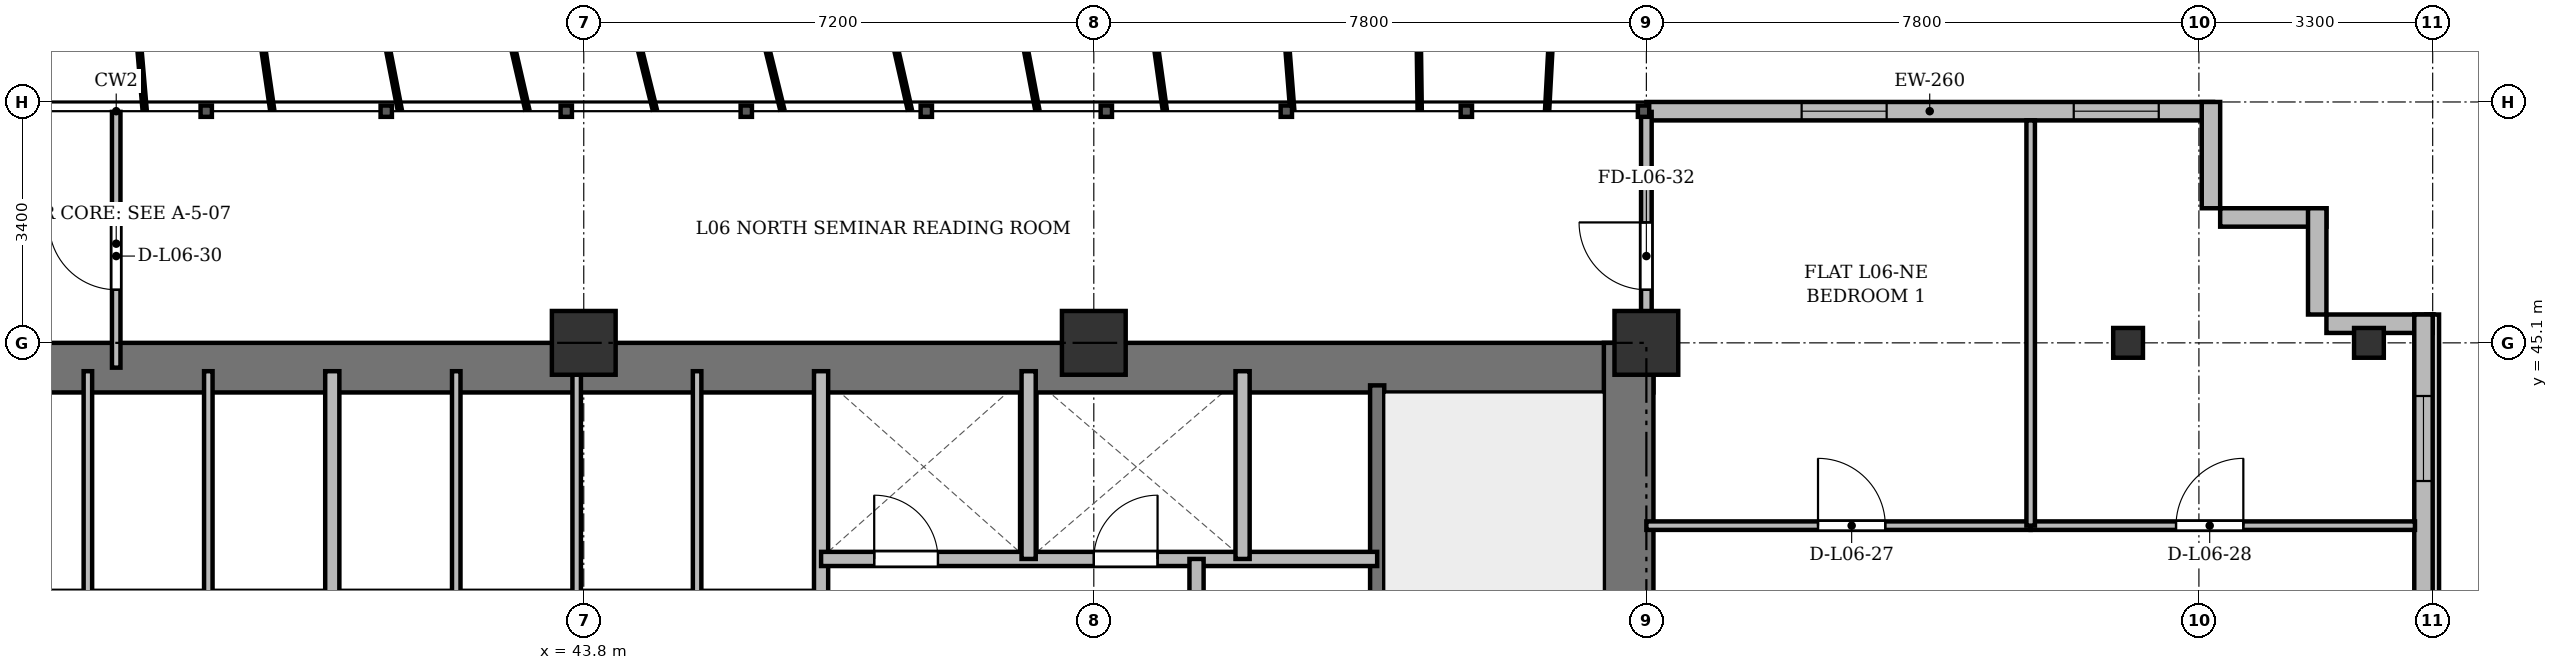
"""IFC4 building model, lengths in metres.
Left out: names, types, materials, properties, quantities, classifications, styles, units other than length and angle.
Written with IfcOpenShell. Run it as: python <this file> out.ifc"""

import sys

from ifc_helpers import new_model, si_unit, direction, frame, frame_2d, origin, origin_2d, place, context, subcontext, project, spatial, rectangle, i_section, extrude, source, transform, mapped, element, fill, save


model = new_model("IFC4")
c1 = context("Model", 3, precision=1e-05, world=origin(), true_north=direction((0.0, 1.0)))
c2 = subcontext(c1, "Body", "Model", "MODEL_VIEW")
j1 = project(units=[si_unit("LENGTHUNIT", "METRE"), si_unit("PLANEANGLEUNIT", "RADIAN")], contexts=[c1])
p1 = place(None, origin())
s1 = spatial("IfcSite", under=j1, at=p1, CompositionType="ELEMENT")
p2 = place(p1, origin())
s2 = spatial("IfcBuilding", under=s1, at=p2, CompositionType="ELEMENT")
p3 = place(p2, frame((0.0, 0.0, 27.1)))
s3 = spatial("IfcBuildingStorey", under=s2, at=p3, CompositionType="ELEMENT", Elevation=27.1)
m1 = source(origin(), c2, "Body", "SweptSolid", [
    extrude(rectangle(XDim=0.9, YDim=0.9, at=origin_2d()), origin(), (0.0, 0.0, 1.0), 3.6),
])
for number, where, z_axis, x_axis in (
    (1, (43.8, 45.1, 0.0), (0.0, 0.0, 1.0), (1.0, 0.0, 0.0)),
    (2, (51.0, 45.1, 0.0), (0.0, 0.0, 1.0), (1.0, 0.0, 0.0)),
    (3, (58.8, 45.1, 0.0), (0.0, 0.0, 1.0), (1.0, 0.0, 0.0)),
):
    element("IfcColumn", number, at=place(p3, frame(where, z_axis=z_axis, x_axis=x_axis)), inside=s3, PredefinedType="COLUMN", context=c2, shape_type="MappedRepresentation", body=[
        mapped(m1, transform((0.0, 0.0, 0.0), x_axis=(1.0, 0.0, 0.0), y_axis=(0.0, 1.0, 0.0), z_axis=(0.0, 0.0, 1.0), scale=1.0)),
    ])
m2 = source(origin(), c2, "Body", "SweptSolid", [
    extrude(i_section(OverallWidth=0.42, OverallDepth=0.42, WebThickness=0.026, FlangeThickness=0.04, at=origin_2d()), origin(), (0.0, 0.0, 1.0), 3.6),
])
for number, where, z_axis, x_axis in (
    (4, (65.6, 45.1, 0.0), (0.0, 0.0, 1.0), (1.0, 0.0, 0.0)),
    (5, (69.0, 45.1, 0.0), (0.0, 0.0, 1.0), (1.0, 0.0, 0.0)),
):
    element("IfcColumn", number, at=place(p3, frame(where, z_axis=z_axis, x_axis=x_axis)), inside=s3, PredefinedType="COLUMN", context=c2, shape_type="MappedRepresentation", body=[
        mapped(m2, transform((0.0, 0.0, 0.0), x_axis=(1.0, 0.0, 0.0), y_axis=(0.0, 1.0, 0.0), z_axis=(0.0, 0.0, 1.0), scale=1.0)),
    ])
p4 = place(p3, frame((58.8, 48.37, 0.0), z_axis=(0.0, 0.0, 1.0), x_axis=(1.0, 0.0, 0.0)))
e6 = element("IfcWall", 6, at=p4, inside=s3, PredefinedType="SOLIDWALL", context=c2, shape_type="SweptSolid", body=[
    extrude(rectangle(XDim=8.0, YDim=0.26, at=frame_2d((4.0, 0.0))), origin(), (0.0, 0.0, 1.0), 3.34),
])
p5 = place(p4, frame((2.192, 0.0, 0.9)))
e7 = element("IfcOpeningElement", 7, at=p5, cuts=e6, PredefinedType="OPENING", context=c2, shape_type="SweptSolid", body=[
    extrude(rectangle(XDim=1.2, YDim=1.65, at=frame_2d((0.6, 0.825))), frame((0.0, 0.14, 0.0), z_axis=(0.0, -1.0, 0.0), x_axis=(1.0, 0.0, 0.0)), (0.0, 0.0, 1.0), 0.28),
])
p6 = place(p4, frame((6.033, 0.0, 0.9)))
e8 = element("IfcOpeningElement", 8, at=p6, cuts=e6, PredefinedType="OPENING", context=c2, shape_type="SweptSolid", body=[
    extrude(rectangle(XDim=1.2, YDim=1.65, at=frame_2d((0.6, 0.825))), frame((0.0, 0.14, 0.0), z_axis=(0.0, -1.0, 0.0), x_axis=(1.0, 0.0, 0.0)), (0.0, 0.0, 1.0), 0.28),
])
for number, where, z_axis, x_axis in (
    (9, (66.77, 48.5, 0.0), (0.0, 0.0, 1.0), (0.0, -1.0, 0.0)),
    (10, (66.9, 46.87, 0.0), (0.0, 0.0, 1.0), (1.0, 0.0, 0.0)),
    (11, (68.27, 47.0, 0.0), (0.0, 0.0, 1.0), (0.0, -1.0, 0.0)),
):
    element("IfcWall", number, at=place(p3, frame(where, z_axis=z_axis, x_axis=x_axis)), inside=s3, PredefinedType="SOLIDWALL", context=c2, shape_type="SweptSolid", body=[
        extrude(rectangle(XDim=1.5, YDim=0.26, at=frame_2d((0.75, 0.0))), origin(), (0.0, 0.0, 1.0), 3.34),
    ])
p7 = place(p3, frame((68.4, 45.37, 0.0), z_axis=(0.0, 0.0, 1.0), x_axis=(1.0, 0.0, 0.0)))
e12 = element("IfcWall", 12, at=p7, inside=s3, PredefinedType="SOLIDWALL", context=c2, shape_type="SweptSolid", body=[
    extrude(rectangle(XDim=1.5, YDim=0.26, at=frame_2d((0.75, 0.0))), origin(), (0.0, 0.0, 1.0), 2.69),
])
p8 = place(p3, frame((69.77, 45.5, 0.0), z_axis=(0.0, 0.0, 1.0), x_axis=(0.0, -1.0, 0.0)))
e13 = element("IfcWall", 13, at=p8, inside=s3, PredefinedType="SOLIDWALL", context=c2, shape_type="SweptSolid", body=[
    extrude(rectangle(XDim=39.6, YDim=0.26, at=frame_2d((19.8, 0.0))), origin(), (0.0, 0.0, 1.0), 3.34),
])
p9 = place(p8, frame((36.95, 0.0, 0.92)))
e14 = element("IfcOpeningElement", 14, at=p9, cuts=e13, PredefinedType="OPENING", context=c2, shape_type="SweptSolid", body=[
    extrude(rectangle(XDim=1.2, YDim=1.65, at=frame_2d((0.6, 0.825))), frame((0.0, 0.14, 0.0), z_axis=(0.0, -1.0, 0.0), x_axis=(1.0, 0.0, 0.0)), (0.0, 0.0, 1.0), 0.28),
])
p10 = place(p8, frame((32.8, 0.0, 0.92)))
e15 = element("IfcOpeningElement", 15, at=p10, cuts=e13, PredefinedType="OPENING", context=c2, shape_type="SweptSolid", body=[
    extrude(rectangle(XDim=2.6, YDim=1.9, at=frame_2d((1.3, 0.95))), frame((0.0, 0.14, 0.0), z_axis=(0.0, -1.0, 0.0), x_axis=(1.0, 0.0, 0.0)), (0.0, 0.0, 1.0), 0.28),
])
p11 = place(p8, frame((28.6, 0.0, 0.92)))
e16 = element("IfcOpeningElement", 16, at=p11, cuts=e13, PredefinedType="OPENING", context=c2, shape_type="SweptSolid", body=[
    extrude(rectangle(XDim=2.6, YDim=1.9, at=frame_2d((1.3, 0.95))), frame((0.0, 0.14, 0.0), z_axis=(0.0, -1.0, 0.0), x_axis=(1.0, 0.0, 0.0)), (0.0, 0.0, 1.0), 0.28),
])
p12 = place(p8, frame((7.4, 0.0, 0.92)))
e17 = element("IfcOpeningElement", 17, at=p12, cuts=e13, PredefinedType="OPENING", context=c2, shape_type="SweptSolid", body=[
    extrude(rectangle(XDim=2.6, YDim=1.9, at=frame_2d((1.3, 0.95))), frame((0.0, 0.14, 0.0), z_axis=(0.0, -1.0, 0.0), x_axis=(1.0, 0.0, 0.0)), (0.0, 0.0, 1.0), 0.28),
])
p13 = place(p8, frame((4.5, 0.0, 0.92)))
e18 = element("IfcOpeningElement", 18, at=p13, cuts=e13, PredefinedType="OPENING", context=c2, shape_type="SweptSolid", body=[
    extrude(rectangle(XDim=1.2, YDim=1.65, at=frame_2d((0.6, 0.825))), frame((0.0, 0.14, 0.0), z_axis=(0.0, -1.0, 0.0), x_axis=(1.0, 0.0, 0.0)), (0.0, 0.0, 1.0), 0.28),
])
p14 = place(p8, frame((1.15, 0.0, 0.92)))
e19 = element("IfcOpeningElement", 19, at=p14, cuts=e13, PredefinedType="OPENING", context=c2, shape_type="SweptSolid", body=[
    extrude(rectangle(XDim=1.2, YDim=1.65, at=frame_2d((0.6, 0.825))), frame((0.0, 0.14, 0.0), z_axis=(0.0, -1.0, 0.0), x_axis=(1.0, 0.0, 0.0)), (0.0, 0.0, 1.0), 0.28),
])
p15 = place(p3, frame((15.5, 44.75, 0.0), z_axis=(0.0, 0.0, 1.0), x_axis=(1.0, 0.0, 0.0)))
e20 = element("IfcWall", 20, at=p15, inside=s3, PredefinedType="SHEAR", context=c2, shape_type="SweptSolid", body=[
    extrude(rectangle(XDim=43.4, YDim=0.7, at=frame_2d((21.7, 0.0))), origin(), (0.0, 0.0, 1.0), 3.34),
])
p16 = place(p3, frame((58.55, 33.4, 0.0), z_axis=(0.0, 0.0, 1.0), x_axis=(0.0, 1.0, 0.0)))
e21 = element("IfcWall", 21, at=p16, inside=s3, PredefinedType="SHEAR", context=c2, shape_type="SweptSolid", body=[
    extrude(rectangle(XDim=11.7, YDim=0.7, at=frame_2d((5.85, 0.0))), origin(), (0.0, 0.0, 1.0), 3.34),
])
p17 = place(p3, frame((55.0, 33.4, 0.0), z_axis=(0.0, 0.0, 1.0), x_axis=(0.0, 1.0, 0.0)))
e22 = element("IfcWall", 22, at=p17, inside=s3, PredefinedType="SHEAR", context=c2, shape_type="SweptSolid", body=[
    extrude(rectangle(XDim=11.1, YDim=0.2, at=frame_2d((5.55, 0.0))), origin(), (0.0, 0.0, 1.0), 3.34),
])
p18 = place(p17, frame((0.85, 0.0, 0.0)))
e23 = element("IfcOpeningElement", 23, at=p18, cuts=e22, PredefinedType="OPENING", context=c2, shape_type="SweptSolid", body=[
    extrude(rectangle(XDim=1.1, YDim=2.15, at=frame_2d((0.55, 1.075))), frame((0.0, 0.11, 0.0), z_axis=(0.0, -1.0, 0.0), x_axis=(1.0, 0.0, 0.0)), (0.0, 0.0, 1.0), 0.22),
])
for number, where, z_axis, x_axis in (
    (24, (36.8, 41.5, 0.0), (0.0, 0.0, 1.0), (0.0, 1.0, 0.0)),
    (25, (38.5, 41.5, 0.0), (0.0, 0.0, 1.0), (0.0, 1.0, 0.0)),
):
    element("IfcWall", number, at=place(p3, frame(where, z_axis=z_axis, x_axis=x_axis)), inside=s3, PredefinedType="PARTITIONING", context=c2, shape_type="SweptSolid", body=[
        extrude(rectangle(XDim=3.2, YDim=0.12, at=frame_2d((1.6, 0.0))), origin(), (0.0, 0.0, 1.0), 3.34),
    ])
p19 = place(p3, frame((40.25, 41.5, 0.0), z_axis=(0.0, 0.0, 1.0), x_axis=(0.0, 1.0, 0.0)))
e26 = element("IfcWall", 26, at=p19, inside=s3, PredefinedType="SOLIDWALL", context=c2, shape_type="SweptSolid", body=[
    extrude(rectangle(XDim=3.2, YDim=0.2, at=frame_2d((1.6, 0.0))), origin(), (0.0, 0.0, 1.0), 3.34),
])
p20 = place(p3, frame((42.0, 41.5, 0.0), z_axis=(0.0, 0.0, 1.0), x_axis=(0.0, 1.0, 0.0)))
e27 = element("IfcWall", 27, at=p20, inside=s3, PredefinedType="PARTITIONING", context=c2, shape_type="SweptSolid", body=[
    extrude(rectangle(XDim=3.2, YDim=0.12, at=frame_2d((1.6, 0.0))), origin(), (0.0, 0.0, 1.0), 3.34),
])
p21 = place(p3, frame((43.7, 41.5, 0.0), z_axis=(0.0, 0.0, 1.0), x_axis=(0.0, 1.0, 0.0)))
e28 = element("IfcWall", 28, at=p21, inside=s3, PredefinedType="PARTITIONING", context=c2, shape_type="SweptSolid", body=[
    extrude(rectangle(XDim=3.2, YDim=0.12, at=frame_2d((1.6, 0.0))), origin(), (0.0, 0.0, 1.0), 2.752),
])
p22 = place(p3, frame((45.4, 41.5, 0.0), z_axis=(0.0, 0.0, 1.0), x_axis=(0.0, 1.0, 0.0)))
e29 = element("IfcWall", 29, at=p22, inside=s3, PredefinedType="PARTITIONING", context=c2, shape_type="SweptSolid", body=[
    extrude(rectangle(XDim=3.2, YDim=0.12, at=frame_2d((1.6, 0.0))), origin(), (0.0, 0.0, 1.0), 3.34),
])
p23 = place(p3, frame((47.15, 33.4, 0.0), z_axis=(0.0, 0.0, 1.0), x_axis=(0.0, 1.0, 0.0)))
e30 = element("IfcWall", 30, at=p23, inside=s3, PredefinedType="SOLIDWALL", context=c2, shape_type="SweptSolid", body=[
    extrude(rectangle(XDim=11.3, YDim=0.2, at=frame_2d((5.65, 0.0))), origin(), (0.0, 0.0, 1.0), 2.69),
])
p24 = place(p3, frame((47.15, 42.05, 0.0), z_axis=(0.0, 0.0, 1.0), x_axis=(1.0, 0.0, 0.0)))
e31 = element("IfcWall", 31, at=p24, inside=s3, PredefinedType="SOLIDWALL", context=c2, shape_type="SweptSolid", body=[
    extrude(rectangle(XDim=7.85, YDim=0.2, at=frame_2d((3.925, 0.0))), origin(), (0.0, 0.0, 1.0), 2.752),
])
p25 = place(p24, frame((0.75, 0.0, 0.0)))
e32 = element("IfcOpeningElement", 32, at=p25, cuts=e31, PredefinedType="OPENING", context=c2, shape_type="SweptSolid", body=[
    extrude(rectangle(XDim=0.9, YDim=2.1, at=frame_2d((0.45, 1.05))), frame((0.0, 0.11, 0.0), z_axis=(0.0, -1.0, 0.0), x_axis=(1.0, 0.0, 0.0)), (0.0, 0.0, 1.0), 0.22),
])
p26 = place(p24, frame((3.85, 0.0, 0.0)))
e33 = element("IfcOpeningElement", 33, at=p26, cuts=e31, PredefinedType="OPENING", context=c2, shape_type="SweptSolid", body=[
    extrude(rectangle(XDim=0.9, YDim=2.1, at=frame_2d((0.45, 1.05))), frame((0.0, 0.11, 0.0), z_axis=(0.0, -1.0, 0.0), x_axis=(1.0, 0.0, 0.0)), (0.0, 0.0, 1.0), 0.22),
])
for number, where, z_axis, x_axis in (
    (34, (50.08, 42.05, 0.0), (0.0, 0.0, 1.0), (0.0, 1.0, 0.0)),
    (35, (53.1, 42.05, 0.0), (0.0, 0.0, 1.0), (0.0, 1.0, 0.0)),
):
    element("IfcWall", number, at=place(p3, frame(where, z_axis=z_axis, x_axis=x_axis)), inside=s3, PredefinedType="SOLIDWALL", context=c2, shape_type="SweptSolid", body=[
        extrude(rectangle(XDim=2.65, YDim=0.2, at=frame_2d((1.325, 0.0))), origin(), (0.0, 0.0, 1.0), 3.34),
    ])
p27 = place(p3, frame((52.45, 33.4, 0.0), z_axis=(0.0, 0.0, 1.0), x_axis=(0.0, 1.0, 0.0)))
e36 = element("IfcWall", 36, at=p27, inside=s3, PredefinedType="PARTITIONING", context=c2, shape_type="SweptSolid", body=[
    extrude(rectangle(XDim=8.65, YDim=0.2, at=frame_2d((4.325, 0.0))), origin(), (0.0, 0.0, 1.0), 2.69),
])
p28 = place(p27, frame((6.2, 0.0, 0.0)))
e37 = element("IfcOpeningElement", 37, at=p28, cuts=e36, PredefinedType="OPENING", context=c2, shape_type="SweptSolid", body=[
    extrude(rectangle(XDim=0.95, YDim=2.15, at=frame_2d((0.475, 1.075))), frame((0.0, 0.11, 0.0), z_axis=(0.0, -1.0, 0.0), x_axis=(1.0, 0.0, 0.0)), (0.0, 0.0, 1.0), 0.22),
])
p29 = place(p3, frame((58.8, 42.52, 0.0), z_axis=(0.0, 0.0, 1.0), x_axis=(1.0, 0.0, 0.0)))
e38 = element("IfcWall", 38, at=p29, inside=s3, PredefinedType="PARTITIONING", context=c2, shape_type="SweptSolid", body=[
    extrude(rectangle(XDim=5.425, YDim=0.12, at=frame_2d((2.712, 0.0))), origin(), (0.0, 0.0, 1.0), 2.752),
])
p30 = place(p29, frame((2.423, 0.0, 0.0)))
e39 = element("IfcOpeningElement", 39, at=p30, cuts=e38, PredefinedType="OPENING", context=c2, shape_type="SweptSolid", body=[
    extrude(rectangle(XDim=0.95, YDim=2.15, at=frame_2d((0.475, 1.075))), frame((0.0, 0.07, 0.0), z_axis=(0.0, -1.0, 0.0), x_axis=(1.0, 0.0, 0.0)), (0.0, 0.0, 1.0), 0.14),
])
p31 = place(p3, frame((64.225, 42.52, 0.0), z_axis=(0.0, 0.0, 1.0), x_axis=(1.0, 0.0, 0.0)))
e40 = element("IfcWall", 40, at=p31, inside=s3, PredefinedType="PARTITIONING", context=c2, shape_type="SweptSolid", body=[
    extrude(rectangle(XDim=5.425, YDim=0.12, at=frame_2d((2.712, 0.0))), origin(), (0.0, 0.0, 1.0), 2.752),
])
p32 = place(p31, frame((2.052, 0.0, 0.0)))
e41 = element("IfcOpeningElement", 41, at=p32, cuts=e40, PredefinedType="OPENING", context=c2, shape_type="SweptSolid", body=[
    extrude(rectangle(XDim=0.95, YDim=2.15, at=frame_2d((0.475, 1.075))), frame((0.0, 0.07, 0.0), z_axis=(0.0, -1.0, 0.0), x_axis=(1.0, 0.0, 0.0)), (0.0, 0.0, 1.0), 0.14),
])
p33 = place(p3, frame((64.225, 42.52, 0.0), z_axis=(0.0, 0.0, 1.0), x_axis=(0.0, 1.0, 0.0)))
e42 = element("IfcWall", 42, at=p33, inside=s3, PredefinedType="PARTITIONING", context=c2, shape_type="SweptSolid", body=[
    extrude(rectangle(XDim=5.72, YDim=0.12, at=frame_2d((2.86, 0.0))), origin(), (0.0, 0.0, 1.0), 2.69),
])
p34 = place(p3, frame((37.2, 44.75, 0.0), z_axis=(0.0, 0.0, 1.0), x_axis=(0.0, 1.0, 0.0)))
e43 = element("IfcWall", 43, at=p34, inside=s3, PredefinedType="PARTITIONING", context=c2, shape_type="SweptSolid", body=[
    extrude(rectangle(XDim=3.61, YDim=0.12, at=frame_2d((1.805, 0.0))), origin(), (0.0, 0.0, 1.0), 2.69),
])
p35 = place(p34, frame((1.1, 0.0, 0.0)))
e44 = element("IfcOpeningElement", 44, at=p35, cuts=e43, PredefinedType="OPENING", context=c2, shape_type="SweptSolid", body=[
    extrude(rectangle(XDim=0.95, YDim=2.15, at=frame_2d((0.475, 1.075))), frame((0.0, 0.07, 0.0), z_axis=(0.0, -1.0, 0.0), x_axis=(1.0, 0.0, 0.0)), (0.0, 0.0, 1.0), 0.14),
])
p36 = place(p3, frame((58.8, 44.75, 0.0), z_axis=(0.0, 0.0, 1.0), x_axis=(0.0, 1.0, 0.0)))
e45 = element("IfcWall", 45, at=p36, inside=s3, PredefinedType="PARTITIONING", context=c2, shape_type="SweptSolid", body=[
    extrude(rectangle(XDim=3.61, YDim=0.15, at=frame_2d((1.805, 0.0))), origin(), (0.0, 0.0, 1.0), 2.752),
])
p37 = place(p36, frame((1.1, 0.0, 0.0)))
e46 = element("IfcOpeningElement", 46, at=p37, cuts=e45, PredefinedType="OPENING", context=c2, shape_type="SweptSolid", body=[
    extrude(rectangle(XDim=0.95, YDim=2.15, at=frame_2d((0.475, 1.075))), frame((0.0, 0.085, 0.0), z_axis=(0.0, -1.0, 0.0), x_axis=(1.0, 0.0, 0.0)), (0.0, 0.0, 1.0), 0.17),
])
m3 = source(origin(), c2, "Body", "SweptSolid", [
    extrude(rectangle(XDim=1.2, YDim=1.65, at=frame_2d((0.6, 0.825))), frame((0.0, 0.03, 0.0), z_axis=(0.0, -1.0, 0.0), x_axis=(1.0, 0.0, 0.0)), (0.0, 0.0, 1.0), 0.06),
])
p38 = place(p5, origin())
e47 = element("IfcWindow", 47, at=p38, inside=s3, PartitioningType="SINGLE_PANEL", PredefinedType="WINDOW", context=c2, shape_type="MappedRepresentation", body=[
    mapped(m3, transform((0.0, 0.0, 0.0), x_axis=(1.0, 0.0, 0.0), y_axis=(0.0, 1.0, 0.0), z_axis=(0.0, 0.0, 1.0), scale=1.0)),
])
fill(e7, e47)
p39 = place(p6, origin())
e48 = element("IfcWindow", 48, at=p39, inside=s3, PartitioningType="SINGLE_PANEL", PredefinedType="WINDOW", context=c2, shape_type="MappedRepresentation", body=[
    mapped(m3, transform((0.0, 0.0, 0.0), x_axis=(1.0, 0.0, 0.0), y_axis=(0.0, 1.0, 0.0), z_axis=(0.0, 0.0, 1.0), scale=1.0)),
])
fill(e8, e48)
p40 = place(p14, origin())
e49 = element("IfcWindow", 49, at=p40, inside=s3, PartitioningType="SINGLE_PANEL", PredefinedType="WINDOW", context=c2, shape_type="MappedRepresentation", body=[
    mapped(m3, transform((0.0, 0.0, 0.0), x_axis=(1.0, 0.0, 0.0), y_axis=(0.0, 1.0, 0.0), z_axis=(0.0, 0.0, 1.0), scale=1.0)),
])
fill(e19, e49)
m4 = source(origin(), c2, "Body", "SweptSolid", [
    extrude(rectangle(XDim=0.9, YDim=2.1, at=frame_2d((0.45, 1.05))), frame((0.0, 0.025, 0.0), z_axis=(0.0, -1.0, 0.0), x_axis=(1.0, 0.0, 0.0)), (0.0, 0.0, 1.0), 0.05),
])
p41 = place(p25, origin())
e50 = element("IfcDoor", 50, at=p41, inside=s3, OperationType="SINGLE_SWING_LEFT", PredefinedType="DOOR", context=c2, shape_type="MappedRepresentation", body=[
    mapped(m4, transform((0.0, 0.0, 0.0), x_axis=(1.0, 0.0, 0.0), y_axis=(0.0, 1.0, 0.0), z_axis=(0.0, 0.0, 1.0), scale=1.0)),
])
fill(e32, e50)
p42 = place(p26, origin())
e51 = element("IfcDoor", 51, at=p42, inside=s3, OperationType="SINGLE_SWING_RIGHT", PredefinedType="DOOR", context=c2, shape_type="MappedRepresentation", body=[
    mapped(m4, transform((0.0, 0.0, 0.0), x_axis=(1.0, 0.0, 0.0), y_axis=(0.0, 1.0, 0.0), z_axis=(0.0, 0.0, 1.0), scale=1.0)),
])
fill(e33, e51)
m5 = source(origin(), c2, "Body", "SweptSolid", [
    extrude(rectangle(XDim=0.95, YDim=2.15, at=frame_2d((0.475, 1.075))), frame((0.0, 0.025, 0.0), z_axis=(0.0, -1.0, 0.0), x_axis=(1.0, 0.0, 0.0)), (0.0, 0.0, 1.0), 0.05),
])
p43 = place(p30, origin())
e52 = element("IfcDoor", 52, at=p43, inside=s3, OperationType="SINGLE_SWING_LEFT", PredefinedType="DOOR", context=c2, shape_type="MappedRepresentation", body=[
    mapped(m5, transform((0.0, 0.0, 0.0), x_axis=(1.0, 0.0, 0.0), y_axis=(0.0, 1.0, 0.0), z_axis=(0.0, 0.0, 1.0), scale=1.0)),
])
fill(e39, e52)
p44 = place(p32, origin())
e53 = element("IfcDoor", 53, at=p44, inside=s3, OperationType="SINGLE_SWING_RIGHT", PredefinedType="DOOR", context=c2, shape_type="MappedRepresentation", body=[
    mapped(m5, transform((0.0, 0.0, 0.0), x_axis=(1.0, 0.0, 0.0), y_axis=(0.0, 1.0, 0.0), z_axis=(0.0, 0.0, 1.0), scale=1.0)),
])
fill(e41, e53)
p45 = place(p35, origin())
e54 = element("IfcDoor", 54, at=p45, inside=s3, OperationType="SINGLE_SWING_RIGHT", PredefinedType="DOOR", context=c2, shape_type="MappedRepresentation", body=[
    mapped(m5, transform((0.0, 0.0, 0.0), x_axis=(1.0, 0.0, 0.0), y_axis=(0.0, 1.0, 0.0), z_axis=(0.0, 0.0, 1.0), scale=1.0)),
])
fill(e44, e54)
p46 = place(p37, origin())
e55 = element("IfcDoor", 55, at=p46, inside=s3, OperationType="SINGLE_SWING_RIGHT", PredefinedType="DOOR", context=c2, shape_type="MappedRepresentation", body=[
    mapped(m5, transform((0.0, 0.0, 0.0), x_axis=(1.0, 0.0, 0.0), y_axis=(0.0, 1.0, 0.0), z_axis=(0.0, 0.0, 1.0), scale=1.0)),
])
fill(e46, e55)
save(model, sys.argv[1])
